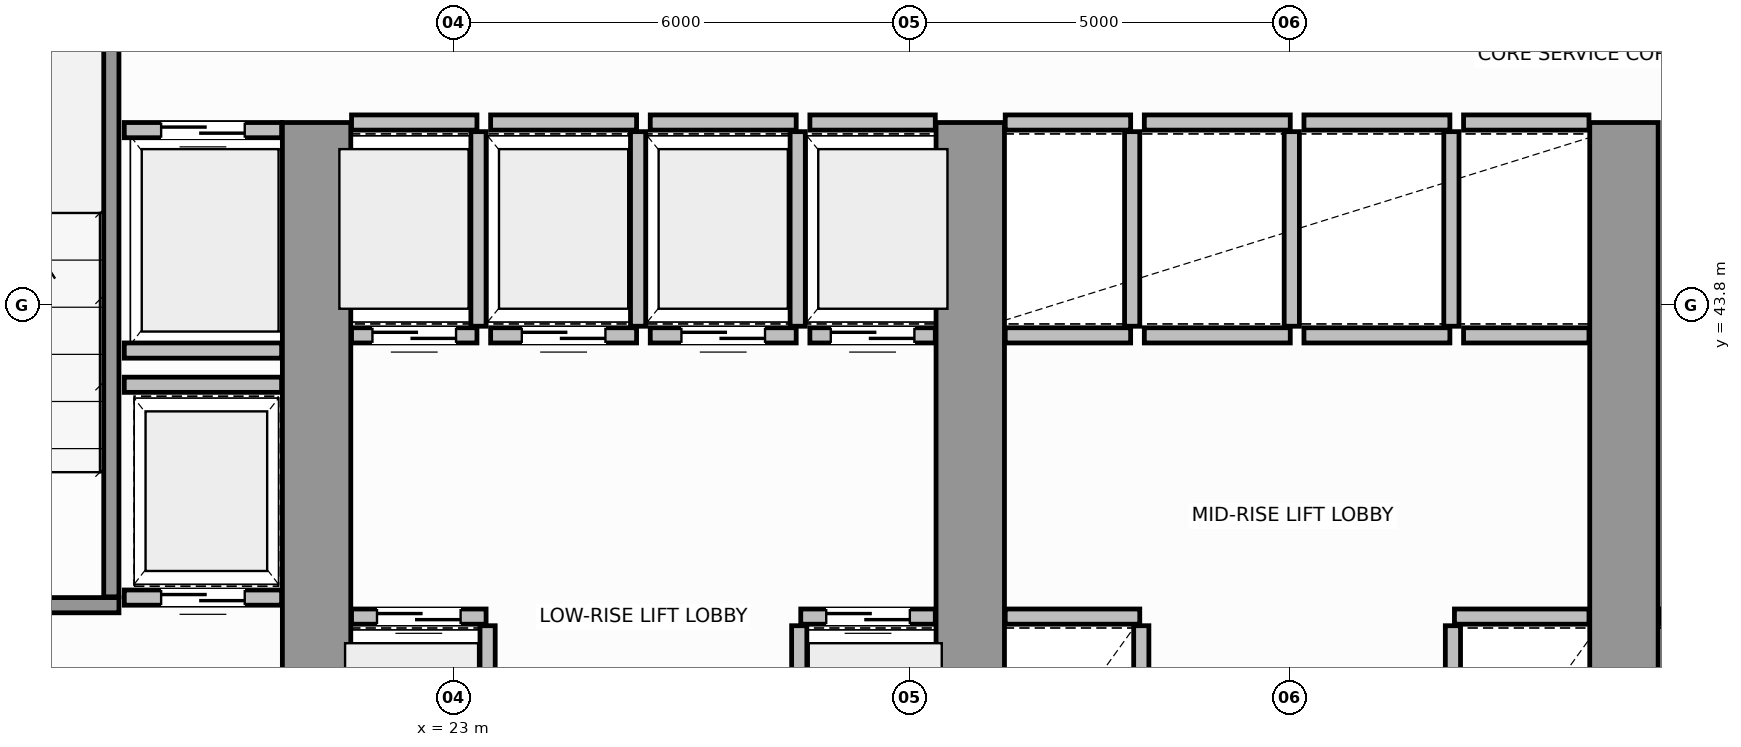
"""IFC4 building model, lengths in metres.
Left out: names, types, materials, properties, quantities, classifications, styles, units other than length and angle.
Written with IfcOpenShell. Run it as: python <this file> out.ifc"""

import sys

from ifc_helpers import new_model, si_unit, direction, frame, frame_2d, origin, place, context, subcontext, project, spatial, rectangle, extrude, source, transform, mapped, element, fill, save


model = new_model("IFC4")
c1 = context("Model", 3, precision=1e-05, world=origin(), true_north=direction((0.0, 1.0)))
c2 = subcontext(c1, "Body", "Model", "MODEL_VIEW")
j1 = project(units=[si_unit("LENGTHUNIT", "METRE"), si_unit("PLANEANGLEUNIT", "RADIAN")], contexts=[c1])
p1 = place(None, origin())
s1 = spatial("IfcSite", under=j1, at=p1, CompositionType="ELEMENT")
p2 = place(p1, origin())
s2 = spatial("IfcBuilding", under=s1, at=p2, CompositionType="ELEMENT")
p3 = place(p2, frame((0.0, 0.0, 64.4)))
s3 = spatial("IfcBuildingStorey", under=s2, at=p3, CompositionType="ELEMENT", Elevation=64.4)
for number, where, z_axis, x_axis in (
    (1, (21.2, 36.97, 0.0), (0.0, 0.0, 1.0), (0.0, 1.0, 0.0)),
    (2, (29.8, 36.97, 0.0), (0.0, 0.0, 1.0), (0.0, 1.0, 0.0)),
    (3, (38.4, 36.97, 0.0), (0.0, 0.0, 1.0), (0.0, 1.0, 0.0)),
):
    element("IfcWall", number, at=place(p3, frame(where, z_axis=z_axis, x_axis=x_axis)), inside=s3, PredefinedType="SHEAR", context=c2, shape_type="SweptSolid", body=[
        extrude(rectangle(XDim=9.23, YDim=0.9, at=frame_2d((4.615, 0.0))), origin(), (0.0, 0.0, 1.0), 3.8),
    ])
p4 = place(p3, frame((14.45, 39.85, 0.0), z_axis=(0.0, 0.0, 1.0), x_axis=(1.0, 0.0, 0.0)))
e4 = element("IfcWall", 4, at=p4, inside=s3, PredefinedType="SOLIDWALL", context=c2, shape_type="SweptSolid", body=[
    extrude(rectangle(XDim=4.15, YDim=0.2, at=frame_2d((2.075, 0.0))), origin(), (0.0, 0.0, 1.0), 3.8),
])
p5 = place(p4, frame((1.725, 0.0, 0.0)))
e5 = element("IfcOpeningElement", 5, at=p5, cuts=e4, PredefinedType="OPENING", context=c2, shape_type="SweptSolid", body=[
    extrude(rectangle(XDim=1.1, YDim=2.15, at=frame_2d((0.55, 1.075))), frame((0.0, 0.11, 0.0), z_axis=(0.0, -1.0, 0.0), x_axis=(1.0, 0.0, 0.0)), (0.0, 0.0, 1.0), 0.22),
])
p6 = place(p3, frame((18.5, 39.96, 0.0), z_axis=(0.0, 0.0, 1.0), x_axis=(0.0, 1.0, 0.0)))
e6 = element("IfcWall", 6, at=p6, inside=s3, PredefinedType="SOLIDWALL", context=c2, shape_type="SweptSolid", body=[
    extrude(rectangle(XDim=9.93, YDim=0.2, at=frame_2d((4.965, 0.0))), origin(), (0.0, 0.0, 1.0), 3.8),
])
p7 = place(p3, frame((21.66, 39.7, 0.0), z_axis=(0.0, 0.0, 1.0), x_axis=(1.0, 0.0, 0.0)))
e7 = element("IfcWall", 7, at=p7, inside=s3, PredefinedType="SOLIDWALL", context=c2, shape_type="SweptSolid", body=[
    extrude(rectangle(XDim=1.77, YDim=0.2, at=frame_2d((0.885, 0.0))), origin(), (0.0, 0.0, 1.0), 3.58),
])
p8 = place(p7, frame((0.335, 0.0, 0.0)))
e8 = element("IfcOpeningElement", 8, at=p8, cuts=e7, PredefinedType="OPENING", context=c2, shape_type="SweptSolid", body=[
    extrude(rectangle(XDim=1.1, YDim=2.15, at=frame_2d((0.55, 1.075))), frame((0.0, 0.11, 0.0), z_axis=(0.0, -1.0, 0.0), x_axis=(1.0, 0.0, 0.0)), (0.0, 0.0, 1.0), 0.22),
])
p9 = place(p3, frame((23.45, 37.02, 0.0), z_axis=(0.0, 0.0, 1.0), x_axis=(0.0, 1.0, 0.0)))
e9 = element("IfcWall", 9, at=p9, inside=s3, PredefinedType="SOLIDWALL", context=c2, shape_type="SweptSolid", body=[
    extrude(rectangle(XDim=2.56, YDim=0.2, at=frame_2d((1.28, 0.0))), origin(), (0.0, 0.0, 1.0), 3.58),
])
p10 = place(p3, frame((27.57, 39.7, 0.0), z_axis=(0.0, 0.0, 1.0), x_axis=(1.0, 0.0, 0.0)))
e10 = element("IfcWall", 10, at=p10, inside=s3, PredefinedType="SOLIDWALL", context=c2, shape_type="SweptSolid", body=[
    extrude(rectangle(XDim=1.77, YDim=0.2, at=frame_2d((0.885, 0.0))), origin(), (0.0, 0.0, 1.0), 3.58),
])
p11 = place(p10, frame((0.335, 0.0, 0.0)))
e11 = element("IfcOpeningElement", 11, at=p11, cuts=e10, PredefinedType="OPENING", context=c2, shape_type="SweptSolid", body=[
    extrude(rectangle(XDim=1.1, YDim=2.15, at=frame_2d((0.55, 1.075))), frame((0.0, 0.11, 0.0), z_axis=(0.0, -1.0, 0.0), x_axis=(1.0, 0.0, 0.0)), (0.0, 0.0, 1.0), 0.22),
])
p12 = place(p3, frame((27.55, 37.02, 0.0), z_axis=(0.0, 0.0, 1.0), x_axis=(0.0, 1.0, 0.0)))
e12 = element("IfcWall", 12, at=p12, inside=s3, PredefinedType="SOLIDWALL", context=c2, shape_type="SweptSolid", body=[
    extrude(rectangle(XDim=2.56, YDim=0.2, at=frame_2d((1.28, 0.0))), origin(), (0.0, 0.0, 1.0), 3.58),
])
p13 = place(p3, frame((21.66, 43.4, 0.0), z_axis=(0.0, 0.0, 1.0), x_axis=(1.0, 0.0, 0.0)))
e13 = element("IfcWall", 13, at=p13, inside=s3, PredefinedType="SOLIDWALL", context=c2, shape_type="SweptSolid", body=[
    extrude(rectangle(XDim=1.65, YDim=0.2, at=frame_2d((0.825, 0.0))), origin(), (0.0, 0.0, 1.0), 3.58),
])
p14 = place(p13, frame((0.275, 0.0, 0.0)))
e14 = element("IfcOpeningElement", 14, at=p14, cuts=e13, PredefinedType="OPENING", context=c2, shape_type="SweptSolid", body=[
    extrude(rectangle(XDim=1.1, YDim=2.15, at=frame_2d((0.55, 1.075))), frame((0.0, 0.11, 0.0), z_axis=(0.0, -1.0, 0.0), x_axis=(1.0, 0.0, 0.0)), (0.0, 0.0, 1.0), 0.22),
])
p15 = place(p3, frame((21.66, 46.2, 0.0), z_axis=(0.0, 0.0, 1.0), x_axis=(1.0, 0.0, 0.0)))
e15 = element("IfcWall", 15, at=p15, inside=s3, PredefinedType="SOLIDWALL", context=c2, shape_type="SweptSolid", body=[
    extrude(rectangle(XDim=1.65, YDim=0.2, at=frame_2d((0.825, 0.0))), origin(), (0.0, 0.0, 1.0), 3.58),
])
p16 = place(p3, frame((23.33, 43.52, 0.0), z_axis=(0.0, 0.0, 1.0), x_axis=(0.0, 1.0, 0.0)))
e16 = element("IfcWall", 16, at=p16, inside=s3, PredefinedType="SOLIDWALL", context=c2, shape_type="SweptSolid", body=[
    extrude(rectangle(XDim=2.56, YDim=0.2, at=frame_2d((1.28, 0.0))), origin(), (0.0, 0.0, 1.0), 3.58),
])
p17 = place(p3, frame((23.49, 43.4, 0.0), z_axis=(0.0, 0.0, 1.0), x_axis=(1.0, 0.0, 0.0)))
e17 = element("IfcWall", 17, at=p17, inside=s3, PredefinedType="SOLIDWALL", context=c2, shape_type="SweptSolid", body=[
    extrude(rectangle(XDim=1.92, YDim=0.2, at=frame_2d((0.96, 0.0))), origin(), (0.0, 0.0, 1.0), 3.58),
])
p18 = place(p17, frame((0.41, 0.0, 0.0)))
e18 = element("IfcOpeningElement", 18, at=p18, cuts=e17, PredefinedType="OPENING", context=c2, shape_type="SweptSolid", body=[
    extrude(rectangle(XDim=1.1, YDim=2.15, at=frame_2d((0.55, 1.075))), frame((0.0, 0.11, 0.0), z_axis=(0.0, -1.0, 0.0), x_axis=(1.0, 0.0, 0.0)), (0.0, 0.0, 1.0), 0.22),
])
p19 = place(p3, frame((23.49, 46.2, 0.0), z_axis=(0.0, 0.0, 1.0), x_axis=(1.0, 0.0, 0.0)))
e19 = element("IfcWall", 19, at=p19, inside=s3, PredefinedType="SOLIDWALL", context=c2, shape_type="SweptSolid", body=[
    extrude(rectangle(XDim=1.92, YDim=0.2, at=frame_2d((0.96, 0.0))), origin(), (0.0, 0.0, 1.0), 3.58),
])
p20 = place(p3, frame((25.43, 43.52, 0.0), z_axis=(0.0, 0.0, 1.0), x_axis=(0.0, 1.0, 0.0)))
e20 = element("IfcWall", 20, at=p20, inside=s3, PredefinedType="SOLIDWALL", context=c2, shape_type="SweptSolid", body=[
    extrude(rectangle(XDim=2.56, YDim=0.2, at=frame_2d((1.28, 0.0))), origin(), (0.0, 0.0, 1.0), 3.58),
])
p21 = place(p3, frame((25.59, 43.4, 0.0), z_axis=(0.0, 0.0, 1.0), x_axis=(1.0, 0.0, 0.0)))
e21 = element("IfcWall", 21, at=p21, inside=s3, PredefinedType="SOLIDWALL", context=c2, shape_type="SweptSolid", body=[
    extrude(rectangle(XDim=1.92, YDim=0.2, at=frame_2d((0.96, 0.0))), origin(), (0.0, 0.0, 1.0), 3.58),
])
p22 = place(p21, frame((0.41, 0.0, 0.0)))
e22 = element("IfcOpeningElement", 22, at=p22, cuts=e21, PredefinedType="OPENING", context=c2, shape_type="SweptSolid", body=[
    extrude(rectangle(XDim=1.1, YDim=2.15, at=frame_2d((0.55, 1.075))), frame((0.0, 0.11, 0.0), z_axis=(0.0, -1.0, 0.0), x_axis=(1.0, 0.0, 0.0)), (0.0, 0.0, 1.0), 0.22),
])
p23 = place(p3, frame((25.59, 46.2, 0.0), z_axis=(0.0, 0.0, 1.0), x_axis=(1.0, 0.0, 0.0)))
e23 = element("IfcWall", 23, at=p23, inside=s3, PredefinedType="SOLIDWALL", context=c2, shape_type="SweptSolid", body=[
    extrude(rectangle(XDim=1.92, YDim=0.2, at=frame_2d((0.96, 0.0))), origin(), (0.0, 0.0, 1.0), 3.58),
])
p24 = place(p3, frame((27.53, 43.52, 0.0), z_axis=(0.0, 0.0, 1.0), x_axis=(0.0, 1.0, 0.0)))
e24 = element("IfcWall", 24, at=p24, inside=s3, PredefinedType="SOLIDWALL", context=c2, shape_type="SweptSolid", body=[
    extrude(rectangle(XDim=2.56, YDim=0.2, at=frame_2d((1.28, 0.0))), origin(), (0.0, 0.0, 1.0), 3.58),
])
p25 = place(p3, frame((27.69, 43.4, 0.0), z_axis=(0.0, 0.0, 1.0), x_axis=(1.0, 0.0, 0.0)))
e25 = element("IfcWall", 25, at=p25, inside=s3, PredefinedType="SOLIDWALL", context=c2, shape_type="SweptSolid", body=[
    extrude(rectangle(XDim=1.65, YDim=0.2, at=frame_2d((0.825, 0.0))), origin(), (0.0, 0.0, 1.0), 3.58),
])
p26 = place(p25, frame((0.275, 0.0, 0.0)))
e26 = element("IfcOpeningElement", 26, at=p26, cuts=e25, PredefinedType="OPENING", context=c2, shape_type="SweptSolid", body=[
    extrude(rectangle(XDim=1.1, YDim=2.15, at=frame_2d((0.55, 1.075))), frame((0.0, 0.11, 0.0), z_axis=(0.0, -1.0, 0.0), x_axis=(1.0, 0.0, 0.0)), (0.0, 0.0, 1.0), 0.22),
])
p27 = place(p3, frame((27.69, 46.2, 0.0), z_axis=(0.0, 0.0, 1.0), x_axis=(1.0, 0.0, 0.0)))
e27 = element("IfcWall", 27, at=p27, inside=s3, PredefinedType="SOLIDWALL", context=c2, shape_type="SweptSolid", body=[
    extrude(rectangle(XDim=1.65, YDim=0.2, at=frame_2d((0.825, 0.0))), origin(), (0.0, 0.0, 1.0), 3.58),
])
p28 = place(p3, frame((30.26, 39.7, 0.0), z_axis=(0.0, 0.0, 1.0), x_axis=(1.0, 0.0, 0.0)))
e28 = element("IfcWall", 28, at=p28, inside=s3, PredefinedType="SOLIDWALL", context=c2, shape_type="SweptSolid", body=[
    extrude(rectangle(XDim=1.77, YDim=0.2, at=frame_2d((0.885, 0.0))), origin(), (0.0, 0.0, 1.0), 3.58),
])
p29 = place(p3, frame((32.05, 37.02, 0.0), z_axis=(0.0, 0.0, 1.0), x_axis=(0.0, 1.0, 0.0)))
e29 = element("IfcWall", 29, at=p29, inside=s3, PredefinedType="SOLIDWALL", context=c2, shape_type="SweptSolid", body=[
    extrude(rectangle(XDim=2.56, YDim=0.2, at=frame_2d((1.28, 0.0))), origin(), (0.0, 0.0, 1.0), 3.58),
])
p30 = place(p3, frame((36.17, 39.7, 0.0), z_axis=(0.0, 0.0, 1.0), x_axis=(1.0, 0.0, 0.0)))
e30 = element("IfcWall", 30, at=p30, inside=s3, PredefinedType="SOLIDWALL", context=c2, shape_type="SweptSolid", body=[
    extrude(rectangle(XDim=1.77, YDim=0.2, at=frame_2d((0.885, 0.0))), origin(), (0.0, 0.0, 1.0), 3.58),
])
p31 = place(p3, frame((36.15, 37.02, 0.0), z_axis=(0.0, 0.0, 1.0), x_axis=(0.0, 1.0, 0.0)))
e31 = element("IfcWall", 31, at=p31, inside=s3, PredefinedType="SOLIDWALL", context=c2, shape_type="SweptSolid", body=[
    extrude(rectangle(XDim=2.56, YDim=0.2, at=frame_2d((1.28, 0.0))), origin(), (0.0, 0.0, 1.0), 3.58),
])
for number, where, z_axis, x_axis in (
    (32, (30.26, 43.4, 0.0), (0.0, 0.0, 1.0), (1.0, 0.0, 0.0)),
    (33, (30.26, 46.2, 0.0), (0.0, 0.0, 1.0), (1.0, 0.0, 0.0)),
):
    element("IfcWall", number, at=place(p3, frame(where, z_axis=z_axis, x_axis=x_axis)), inside=s3, PredefinedType="SOLIDWALL", context=c2, shape_type="SweptSolid", body=[
        extrude(rectangle(XDim=1.65, YDim=0.2, at=frame_2d((0.825, 0.0))), origin(), (0.0, 0.0, 1.0), 3.58),
    ])
p32 = place(p3, frame((31.93, 43.52, 0.0), z_axis=(0.0, 0.0, 1.0), x_axis=(0.0, 1.0, 0.0)))
e34 = element("IfcWall", 34, at=p32, inside=s3, PredefinedType="SOLIDWALL", context=c2, shape_type="SweptSolid", body=[
    extrude(rectangle(XDim=2.56, YDim=0.2, at=frame_2d((1.28, 0.0))), origin(), (0.0, 0.0, 1.0), 3.58),
])
for number, where, z_axis, x_axis in (
    (35, (32.09, 43.4, 0.0), (0.0, 0.0, 1.0), (1.0, 0.0, 0.0)),
    (36, (32.09, 46.2, 0.0), (0.0, 0.0, 1.0), (1.0, 0.0, 0.0)),
):
    element("IfcWall", number, at=place(p3, frame(where, z_axis=z_axis, x_axis=x_axis)), inside=s3, PredefinedType="SOLIDWALL", context=c2, shape_type="SweptSolid", body=[
        extrude(rectangle(XDim=1.92, YDim=0.2, at=frame_2d((0.96, 0.0))), origin(), (0.0, 0.0, 1.0), 3.58),
    ])
p33 = place(p3, frame((34.03, 43.52, 0.0), z_axis=(0.0, 0.0, 1.0), x_axis=(0.0, 1.0, 0.0)))
e37 = element("IfcWall", 37, at=p33, inside=s3, PredefinedType="SOLIDWALL", context=c2, shape_type="SweptSolid", body=[
    extrude(rectangle(XDim=2.56, YDim=0.2, at=frame_2d((1.28, 0.0))), origin(), (0.0, 0.0, 1.0), 3.58),
])
for number, where, z_axis, x_axis in (
    (38, (34.19, 43.4, 0.0), (0.0, 0.0, 1.0), (1.0, 0.0, 0.0)),
    (39, (34.19, 46.2, 0.0), (0.0, 0.0, 1.0), (1.0, 0.0, 0.0)),
):
    element("IfcWall", number, at=place(p3, frame(where, z_axis=z_axis, x_axis=x_axis)), inside=s3, PredefinedType="SOLIDWALL", context=c2, shape_type="SweptSolid", body=[
        extrude(rectangle(XDim=1.92, YDim=0.2, at=frame_2d((0.96, 0.0))), origin(), (0.0, 0.0, 1.0), 3.58),
    ])
p34 = place(p3, frame((36.13, 43.52, 0.0), z_axis=(0.0, 0.0, 1.0), x_axis=(0.0, 1.0, 0.0)))
e40 = element("IfcWall", 40, at=p34, inside=s3, PredefinedType="SOLIDWALL", context=c2, shape_type="SweptSolid", body=[
    extrude(rectangle(XDim=2.56, YDim=0.2, at=frame_2d((1.28, 0.0))), origin(), (0.0, 0.0, 1.0), 3.58),
])
for number, where, z_axis, x_axis in (
    (41, (36.29, 43.4, 0.0), (0.0, 0.0, 1.0), (1.0, 0.0, 0.0)),
    (42, (36.29, 46.2, 0.0), (0.0, 0.0, 1.0), (1.0, 0.0, 0.0)),
):
    element("IfcWall", number, at=place(p3, frame(where, z_axis=z_axis, x_axis=x_axis)), inside=s3, PredefinedType="SOLIDWALL", context=c2, shape_type="SweptSolid", body=[
        extrude(rectangle(XDim=1.65, YDim=0.2, at=frame_2d((0.825, 0.0))), origin(), (0.0, 0.0, 1.0), 3.58),
    ])
p35 = place(p3, frame((38.86, 39.7, 0.0), z_axis=(0.0, 0.0, 1.0), x_axis=(1.0, 0.0, 0.0)))
e43 = element("IfcWall", 43, at=p35, inside=s3, PredefinedType="SOLIDWALL", context=c2, shape_type="SweptSolid", body=[
    extrude(rectangle(XDim=1.77, YDim=0.2, at=frame_2d((0.885, 0.0))), origin(), (0.0, 0.0, 1.0), 3.58),
])
p36 = place(p3, frame((18.67, 46.1, 0.0), z_axis=(0.0, 0.0, 1.0), x_axis=(1.0, 0.0, 0.0)))
e44 = element("IfcWall", 44, at=p36, inside=s3, PredefinedType="SOLIDWALL", context=c2, shape_type="SweptSolid", body=[
    extrude(rectangle(XDim=2.07, YDim=0.2, at=frame_2d((1.035, 0.0))), origin(), (0.0, 0.0, 1.0), 3.58),
])
p37 = place(p36, frame((0.485, 0.0, 0.0)))
e45 = element("IfcOpeningElement", 45, at=p37, cuts=e44, PredefinedType="OPENING", context=c2, shape_type="SweptSolid", body=[
    extrude(rectangle(XDim=1.1, YDim=2.15, at=frame_2d((0.55, 1.075))), frame((0.0, 0.11, 0.0), z_axis=(0.0, -1.0, 0.0), x_axis=(1.0, 0.0, 0.0)), (0.0, 0.0, 1.0), 0.22),
])
p38 = place(p3, frame((18.67, 43.2, 0.0), z_axis=(0.0, 0.0, 1.0), x_axis=(1.0, 0.0, 0.0)))
e46 = element("IfcWall", 46, at=p38, inside=s3, PredefinedType="SOLIDWALL", context=c2, shape_type="SweptSolid", body=[
    extrude(rectangle(XDim=2.07, YDim=0.2, at=frame_2d((1.035, 0.0))), origin(), (0.0, 0.0, 1.0), 3.58),
])
p39 = place(p3, frame((18.67, 39.95, 0.0), z_axis=(0.0, 0.0, 1.0), x_axis=(1.0, 0.0, 0.0)))
e47 = element("IfcWall", 47, at=p39, inside=s3, PredefinedType="SOLIDWALL", context=c2, shape_type="SweptSolid", body=[
    extrude(rectangle(XDim=2.07, YDim=0.2, at=frame_2d((1.035, 0.0))), origin(), (0.0, 0.0, 1.0), 3.58),
])
p40 = place(p39, frame((0.485, 0.0, 0.0)))
e48 = element("IfcOpeningElement", 48, at=p40, cuts=e47, PredefinedType="OPENING", context=c2, shape_type="SweptSolid", body=[
    extrude(rectangle(XDim=1.1, YDim=2.15, at=frame_2d((0.55, 1.075))), frame((0.0, 0.11, 0.0), z_axis=(0.0, -1.0, 0.0), x_axis=(1.0, 0.0, 0.0)), (0.0, 0.0, 1.0), 0.22),
])
p41 = place(p3, frame((18.67, 42.75, 0.0), z_axis=(0.0, 0.0, 1.0), x_axis=(1.0, 0.0, 0.0)))
e49 = element("IfcWall", 49, at=p41, inside=s3, PredefinedType="SOLIDWALL", context=c2, shape_type="SweptSolid", body=[
    extrude(rectangle(XDim=2.07, YDim=0.2, at=frame_2d((1.035, 0.0))), origin(), (0.0, 0.0, 1.0), 3.58),
])
m1 = source(origin(), c2, "Body", "SweptSolid", [
    extrude(rectangle(XDim=1.1, YDim=2.15, at=frame_2d((0.55, 1.075))), frame((0.0, 0.025, 0.0), z_axis=(0.0, -1.0, 0.0), x_axis=(1.0, 0.0, 0.0)), (0.0, 0.0, 1.0), 0.05),
])
p42 = place(p8, origin())
e50 = element("IfcDoor", 50, at=p42, inside=s3, OperationType="DOUBLE_DOOR_SLIDING", PredefinedType="DOOR", context=c2, shape_type="MappedRepresentation", body=[
    mapped(m1, transform((0.0, 0.0, 0.0), scale=1.0)),
])
fill(e8, e50)
p43 = place(p11, origin())
e51 = element("IfcDoor", 51, at=p43, inside=s3, OperationType="DOUBLE_DOOR_SLIDING", PredefinedType="DOOR", context=c2, shape_type="MappedRepresentation", body=[
    mapped(m1, transform((0.0, 0.0, 0.0), scale=1.0)),
])
fill(e11, e51)
p44 = place(p14, origin())
e52 = element("IfcDoor", 52, at=p44, inside=s3, OperationType="DOUBLE_DOOR_SLIDING", PredefinedType="DOOR", context=c2, shape_type="MappedRepresentation", body=[
    mapped(m1, transform((0.0, 0.0, 0.0), scale=1.0)),
])
fill(e14, e52)
p45 = place(p18, origin())
e53 = element("IfcDoor", 53, at=p45, inside=s3, OperationType="DOUBLE_DOOR_SLIDING", PredefinedType="DOOR", context=c2, shape_type="MappedRepresentation", body=[
    mapped(m1, transform((0.0, 0.0, 0.0), scale=1.0)),
])
fill(e18, e53)
p46 = place(p22, origin())
e54 = element("IfcDoor", 54, at=p46, inside=s3, OperationType="DOUBLE_DOOR_SLIDING", PredefinedType="DOOR", context=c2, shape_type="MappedRepresentation", body=[
    mapped(m1, transform((0.0, 0.0, 0.0), scale=1.0)),
])
fill(e22, e54)
p47 = place(p26, origin())
e55 = element("IfcDoor", 55, at=p47, inside=s3, OperationType="DOUBLE_DOOR_SLIDING", PredefinedType="DOOR", context=c2, shape_type="MappedRepresentation", body=[
    mapped(m1, transform((0.0, 0.0, 0.0), scale=1.0)),
])
fill(e26, e55)
p48 = place(p37, origin())
e56 = element("IfcDoor", 56, at=p48, inside=s3, OperationType="DOUBLE_DOOR_SLIDING", PredefinedType="DOOR", context=c2, shape_type="MappedRepresentation", body=[
    mapped(m1, transform((0.0, 0.0, 0.0), scale=1.0)),
])
fill(e45, e56)
p49 = place(p40, origin())
e57 = element("IfcDoor", 57, at=p49, inside=s3, OperationType="DOUBLE_DOOR_SLIDING", PredefinedType="DOOR", context=c2, shape_type="MappedRepresentation", body=[
    mapped(m1, transform((0.0, 0.0, 0.0), scale=1.0)),
])
fill(e48, e57)
save(model, sys.argv[1])
